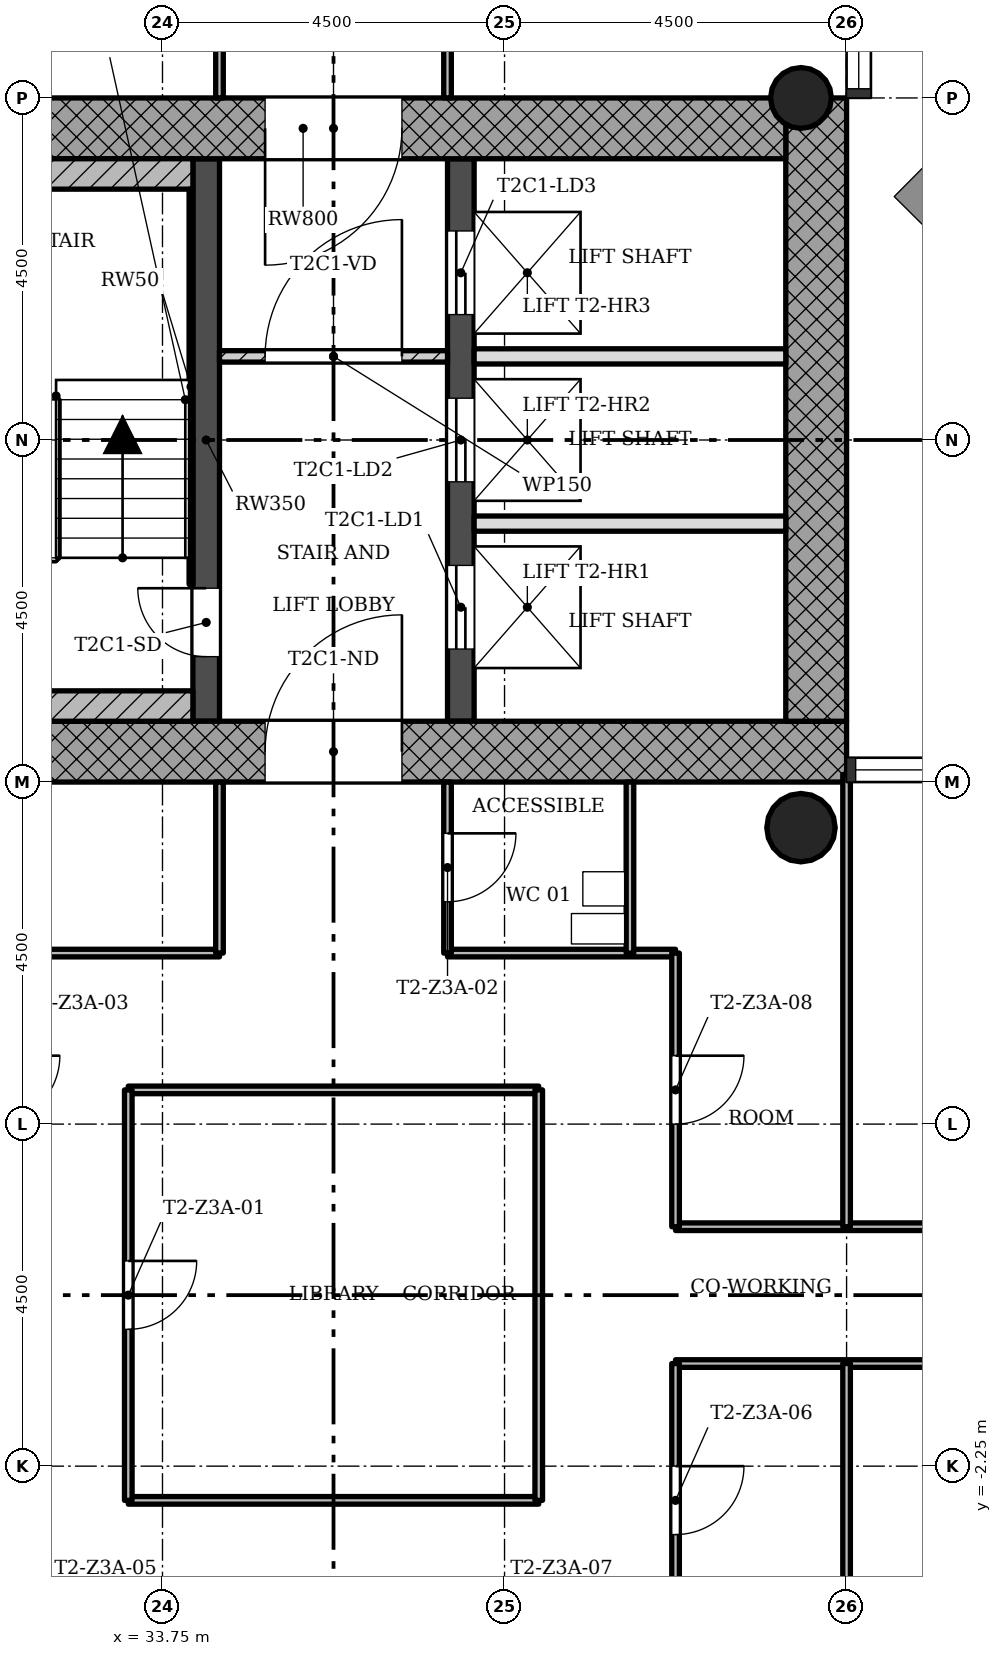
"""IFC4 building model, lengths in metres.
Left out: names, types, materials, properties, quantities, classifications, styles, units other than length and angle.
Written with IfcOpenShell. Run it as: python <this file> out.ifc"""

import sys

from ifc_helpers import new_model, si_unit, direction, frame, frame_2d, origin, origin_2d, place, context, subcontext, project, spatial, rectangle, hollow_circle, extrude, element, fill, save


model = new_model("IFC4")
c1 = context("Model", 3, precision=1e-05, world=origin(), true_north=direction((0.0, 1.0)))
c2 = subcontext(c1, "Body", "Model", "MODEL_VIEW")
j1 = project(units=[si_unit("LENGTHUNIT", "METRE"), si_unit("PLANEANGLEUNIT", "RADIAN")], contexts=[c1])
p1 = place(None, origin())
s1 = spatial("IfcSite", under=j1, at=p1, CompositionType="ELEMENT")
p2 = place(p1, origin())
s2 = spatial("IfcBuilding", under=s1, at=p2, CompositionType="ELEMENT")
p3 = place(p2, frame((0.0, 0.0, 137.1)))
s3 = spatial("IfcBuildingStorey", under=s2, at=p3, CompositionType="ELEMENT", Elevation=137.1)
p4 = place(p3, frame((30.05, 7.15, 0.0), z_axis=(0.0, 0.0, 1.0), x_axis=(1.0, 0.0, 0.0)))
e1 = element("IfcWall", 1, at=p4, inside=s3, PredefinedType="SHEAR", context=c2, shape_type="SweptSolid", body=[
    extrude(rectangle(XDim=12.7, YDim=0.8, at=frame_2d((6.35, 0.0))), origin(), (0.0, 0.0, 1.0), 3.4),
])
p5 = place(p4, frame((5.05, 0.0, 0.0)))
e2 = element("IfcOpeningElement", 2, at=p5, cuts=e1, PredefinedType="OPENING", context=c2, shape_type="SweptSolid", body=[
    extrude(rectangle(XDim=1.8, YDim=2.1, at=frame_2d((0.9, 1.05))), frame((0.0, 0.41, 0.0), z_axis=(0.0, -1.0, 0.0), x_axis=(1.0, 0.0, 0.0)), (0.0, 0.0, 1.0), 0.82),
])
p6 = place(p3, frame((42.35, 7.55, 0.0), z_axis=(0.0, 0.0, 1.0), x_axis=(0.0, 1.0, 0.0)))
e3 = element("IfcWall", 3, at=p6, inside=s3, PredefinedType="SHEAR", context=c2, shape_type="SweptSolid", body=[
    extrude(rectangle(XDim=8.2, YDim=0.8, at=frame_2d((4.1, 0.0))), origin(), (0.0, 0.0, 1.0), 3.4),
])
p7 = place(p3, frame((41.95, 15.35, 0.0), z_axis=(0.0, 0.0, 1.0), x_axis=(-1.0, 0.0, 0.0)))
e4 = element("IfcWall", 4, at=p7, inside=s3, PredefinedType="SHEAR", context=c2, shape_type="SweptSolid", body=[
    extrude(rectangle(XDim=12.7, YDim=0.8, at=frame_2d((6.35, 0.0))), origin(), (0.0, 0.0, 1.0), 3.4),
])
p8 = place(p7, frame((5.05, 0.0, 0.0)))
e5 = element("IfcOpeningElement", 5, at=p8, cuts=e4, PredefinedType="OPENING", context=c2, shape_type="SweptSolid", body=[
    extrude(rectangle(XDim=1.8, YDim=2.1, at=frame_2d((0.9, 1.05))), frame((0.0, 0.41, 0.0), z_axis=(0.0, -1.0, 0.0), x_axis=(1.0, 0.0, 0.0)), (0.0, 0.0, 1.0), 0.82),
])
p9 = place(p3, frame((34.325, 7.55, 0.0), z_axis=(0.0, 0.0, 1.0), x_axis=(0.0, 1.0, 0.0)))
e6 = element("IfcWall", 6, at=p9, inside=s3, PredefinedType="SHEAR", context=c2, shape_type="SweptSolid", body=[
    extrude(rectangle(XDim=7.4, YDim=0.35, at=frame_2d((3.7, 0.0))), origin(), (0.0, 0.0, 1.0), 3.4),
])
p10 = place(p9, frame((0.85, 0.0, 0.0)))
e7 = element("IfcOpeningElement", 7, at=p10, cuts=e6, PredefinedType="OPENING", context=c2, shape_type="SweptSolid", body=[
    extrude(rectangle(XDim=0.9, YDim=2.1, at=frame_2d((0.45, 1.05))), frame((0.0, 0.185, 0.0), z_axis=(0.0, -1.0, 0.0), x_axis=(1.0, 0.0, 0.0)), (0.0, 0.0, 1.0), 0.37),
])
p11 = place(p3, frame((37.675, 7.55, 0.0), z_axis=(0.0, 0.0, 1.0), x_axis=(0.0, 1.0, 0.0)))
e8 = element("IfcWall", 8, at=p11, inside=s3, PredefinedType="SHEAR", context=c2, shape_type="SweptSolid", body=[
    extrude(rectangle(XDim=7.4, YDim=0.35, at=frame_2d((3.7, 0.0))), origin(), (0.0, 0.0, 1.0), 3.4),
])
p12 = place(p11, frame((0.95, 0.0, 0.0)))
e9 = element("IfcOpeningElement", 9, at=p12, cuts=e8, PredefinedType="OPENING", context=c2, shape_type="SweptSolid", body=[
    extrude(rectangle(XDim=1.1, YDim=2.1, at=frame_2d((0.55, 1.05))), frame((0.0, 0.185, 0.0), z_axis=(0.0, -1.0, 0.0), x_axis=(1.0, 0.0, 0.0)), (0.0, 0.0, 1.0), 0.37),
])
p13 = place(p11, frame((3.15, 0.0, 0.0)))
e10 = element("IfcOpeningElement", 10, at=p13, cuts=e8, PredefinedType="OPENING", context=c2, shape_type="SweptSolid", body=[
    extrude(rectangle(XDim=1.1, YDim=2.1, at=frame_2d((0.55, 1.05))), frame((0.0, 0.185, 0.0), z_axis=(0.0, -1.0, 0.0), x_axis=(1.0, 0.0, 0.0)), (0.0, 0.0, 1.0), 0.37),
])
p14 = place(p11, frame((5.35, 0.0, 0.0)))
e11 = element("IfcOpeningElement", 11, at=p14, cuts=e8, PredefinedType="OPENING", context=c2, shape_type="SweptSolid", body=[
    extrude(rectangle(XDim=1.1, YDim=2.1, at=frame_2d((0.55, 1.05))), frame((0.0, 0.185, 0.0), z_axis=(0.0, -1.0, 0.0), x_axis=(1.0, 0.0, 0.0)), (0.0, 0.0, 1.0), 0.37),
])
p15 = place(p3, frame((42.15, 15.75, 0.0), z_axis=(0.0, 0.0, 1.0), x_axis=(1.0, 0.0, 0.0)))
e12 = element("IfcColumn", 12, at=p15, inside=s3, PredefinedType="COLUMN", context=c2, shape_type="SweptSolid", body=[
    extrude(hollow_circle(Radius=0.4, WallThickness=0.028, at=origin_2d()), origin(), (0.0, 0.0, 1.0), 3.4),
])
p16 = place(p3, frame((42.15, 6.15, 0.0), z_axis=(0.0, 0.0, 1.0), x_axis=(1.0, 0.0, 0.0)))
e13 = element("IfcColumn", 13, at=p16, inside=s3, PredefinedType="COLUMN", context=c2, shape_type="SweptSolid", body=[
    extrude(hollow_circle(Radius=0.45, WallThickness=0.032, at=origin_2d()), origin(), (0.0, 0.0, 1.0), 3.4),
])
p17 = place(p3, frame((37.5, 12.35, 0.0), z_axis=(0.0, 0.0, 1.0), x_axis=(-1.0, 0.0, 0.0)))
e14 = element("IfcWall", 14, at=p17, inside=s3, PredefinedType="PARTITIONING", context=c2, shape_type="SweptSolid", body=[
    extrude(rectangle(XDim=3.0, YDim=0.15, at=frame_2d((1.5, 0.0))), origin(), (0.0, 0.0, 1.0), 3.0),
])
p18 = place(p17, frame((0.6, 0.0, 0.0)))
e15 = element("IfcOpeningElement", 15, at=p18, cuts=e14, PredefinedType="OPENING", context=c2, shape_type="SweptSolid", body=[
    extrude(rectangle(XDim=1.8, YDim=2.1, at=frame_2d((0.9, 1.05))), frame((0.0, 0.085, 0.0), z_axis=(0.0, -1.0, 0.0), x_axis=(1.0, 0.0, 0.0)), (0.0, 0.0, 1.0), 0.17),
])
for number, where, z_axis, x_axis in (
    (16, (41.95, 10.15, 0.0), (0.0, 0.0, 1.0), (-1.0, 0.0, 0.0)),
    (17, (41.95, 12.35, 0.0), (0.0, 0.0, 1.0), (-1.0, 0.0, 0.0)),
):
    element("IfcWall", number, at=place(p3, frame(where, z_axis=z_axis, x_axis=x_axis)), inside=s3, PredefinedType="SOLIDWALL", context=c2, shape_type="SweptSolid", body=[
        extrude(rectangle(XDim=4.1, YDim=0.2, at=frame_2d((2.05, 0.0))), origin(), (0.0, 0.0, 1.0), 3.0),
    ])
p19 = place(p3, frame((38.7, -2.7, 0.0), z_axis=(0.0, 0.0, 1.0), x_axis=(-1.0, 0.0, 0.0)))
e18 = element("IfcWall", 18, at=p19, inside=s3, PredefinedType="PARTITIONING", context=c2, shape_type="SweptSolid", body=[
    extrude(rectangle(XDim=5.4, YDim=0.1, at=frame_2d((2.7, 0.0))), origin(), (0.0, 0.0, 1.0), 3.0),
])
p20 = place(p3, frame((47.25, -0.9, 0.0), z_axis=(0.0, 0.0, 1.0), x_axis=(-1.0, 0.0, 0.0)))
e19 = element("IfcWall", 19, at=p20, inside=s3, PredefinedType="PARTITIONING", context=c2, shape_type="SweptSolid", body=[
    extrude(rectangle(XDim=6.75, YDim=0.1, at=frame_2d((3.375, 0.0))), origin(), (0.0, 0.0, 1.0), 3.0),
])
p21 = place(p20, frame((1.8, 0.0, 0.0)))
e20 = element("IfcOpeningElement", 20, at=p21, cuts=e19, PredefinedType="OPENING", context=c2, shape_type="SweptSolid", body=[
    extrude(rectangle(XDim=0.9, YDim=2.1, at=frame_2d((0.45, 1.05))), frame((0.0, 0.06, 0.0), z_axis=(0.0, -1.0, 0.0), x_axis=(1.0, 0.0, 0.0)), (0.0, 0.0, 1.0), 0.12),
])
p22 = place(p3, frame((47.25, 0.9, 0.0), z_axis=(0.0, 0.0, 1.0), x_axis=(-1.0, 0.0, 0.0)))
e21 = element("IfcWall", 21, at=p22, inside=s3, PredefinedType="PARTITIONING", context=c2, shape_type="SweptSolid", body=[
    extrude(rectangle(XDim=6.75, YDim=0.1, at=frame_2d((3.375, 0.0))), origin(), (0.0, 0.0, 1.0), 3.0),
])
p23 = place(p22, frame((1.8, 0.0, 0.0)))
e22 = element("IfcOpeningElement", 22, at=p23, cuts=e21, PredefinedType="OPENING", context=c2, shape_type="SweptSolid", body=[
    extrude(rectangle(XDim=0.9, YDim=2.1, at=frame_2d((0.45, 1.05))), frame((0.0, 0.06, 0.0), z_axis=(0.0, -1.0, 0.0), x_axis=(1.0, 0.0, 0.0)), (0.0, 0.0, 1.0), 0.12),
])
p24 = place(p3, frame((38.7, 2.7, 0.0), z_axis=(0.0, 0.0, 1.0), x_axis=(-1.0, 0.0, 0.0)))
e23 = element("IfcWall", 23, at=p24, inside=s3, PredefinedType="PARTITIONING", context=c2, shape_type="SweptSolid", body=[
    extrude(rectangle(XDim=5.4, YDim=0.1, at=frame_2d((2.7, 0.0))), origin(), (0.0, 0.0, 1.0), 3.0),
])
for number, where, z_axis, x_axis in (
    (24, (40.5, 4.5, 0.0), (0.0, 0.0, 1.0), (-1.0, 0.0, 0.0)),
    (25, (34.5, 4.5, 0.0), (0.0, 0.0, 1.0), (-1.0, 0.0, 0.0)),
):
    element("IfcWall", number, at=place(p3, frame(where, z_axis=z_axis, x_axis=x_axis)), inside=s3, PredefinedType="PARTITIONING", context=c2, shape_type="SweptSolid", body=[
        extrude(rectangle(XDim=3.0, YDim=0.1, at=frame_2d((1.5, 0.0))), origin(), (0.0, 0.0, 1.0), 3.0),
    ])
for number, where, z_axis, x_axis in (
    (26, (42.75, -6.85, 0.0), (0.0, 0.0, 1.0), (0.0, 1.0, 0.0)),
    (27, (42.75, 0.9, 0.0), (0.0, 0.0, 1.0), (0.0, 1.0, 0.0)),
):
    element("IfcWall", number, at=place(p3, frame(where, z_axis=z_axis, x_axis=x_axis)), inside=s3, PredefinedType="PARTITIONING", context=c2, shape_type="SweptSolid", body=[
        extrude(rectangle(XDim=5.95, YDim=0.1, at=frame_2d((2.975, 0.0))), origin(), (0.0, 0.0, 1.0), 3.0),
    ])
p25 = place(p3, frame((40.5, -6.75, 0.0), z_axis=(0.0, 0.0, 1.0), x_axis=(0.0, 1.0, 0.0)))
e28 = element("IfcWall", 28, at=p25, inside=s3, PredefinedType="PARTITIONING", context=c2, shape_type="SweptSolid", body=[
    extrude(rectangle(XDim=5.85, YDim=0.1, at=frame_2d((2.925, 0.0))), origin(), (0.0, 0.0, 1.0), 3.0),
])
p26 = place(p25, frame((3.6, 0.0, 0.0)))
e29 = element("IfcOpeningElement", 29, at=p26, cuts=e28, PredefinedType="OPENING", context=c2, shape_type="SweptSolid", body=[
    extrude(rectangle(XDim=0.9, YDim=2.1, at=frame_2d((0.45, 1.05))), frame((0.0, 0.06, 0.0), z_axis=(0.0, -1.0, 0.0), x_axis=(1.0, 0.0, 0.0)), (0.0, 0.0, 1.0), 0.12),
])
p27 = place(p3, frame((40.5, 0.9, 0.0), z_axis=(0.0, 0.0, 1.0), x_axis=(0.0, 1.0, 0.0)))
e30 = element("IfcWall", 30, at=p27, inside=s3, PredefinedType="PARTITIONING", context=c2, shape_type="SweptSolid", body=[
    extrude(rectangle(XDim=3.6, YDim=0.1, at=frame_2d((1.8, 0.0))), origin(), (0.0, 0.0, 1.0), 3.0),
])
p28 = place(p27, frame((1.35, 0.0, 0.0)))
e31 = element("IfcOpeningElement", 31, at=p28, cuts=e30, PredefinedType="OPENING", context=c2, shape_type="SweptSolid", body=[
    extrude(rectangle(XDim=0.9, YDim=2.1, at=frame_2d((0.45, 1.05))), frame((0.0, 0.06, 0.0), z_axis=(0.0, -1.0, 0.0), x_axis=(1.0, 0.0, 0.0)), (0.0, 0.0, 1.0), 0.12),
])
p29 = place(p3, frame((39.9, 4.5, 0.0), z_axis=(0.0, 0.0, 1.0), x_axis=(0.0, 1.0, 0.0)))
e32 = element("IfcWall", 32, at=p29, inside=s3, PredefinedType="PARTITIONING", context=c2, shape_type="SweptSolid", body=[
    extrude(rectangle(XDim=2.25, YDim=0.1, at=frame_2d((1.125, 0.0))), origin(), (0.0, 0.0, 1.0), 3.0),
])
p30 = place(p3, frame((38.7, -2.7, 0.0), z_axis=(0.0, 0.0, 1.0), x_axis=(0.0, 1.0, 0.0)))
e33 = element("IfcWall", 33, at=p30, inside=s3, PredefinedType="PARTITIONING", context=c2, shape_type="SweptSolid", body=[
    extrude(rectangle(XDim=5.4, YDim=0.1, at=frame_2d((2.7, 0.0))), origin(), (0.0, 0.0, 1.0), 3.0),
])
p31 = place(p3, frame((37.5, 4.5, 0.0), z_axis=(0.0, 0.0, 1.0), x_axis=(0.0, 1.0, 0.0)))
e34 = element("IfcWall", 34, at=p31, inside=s3, PredefinedType="PARTITIONING", context=c2, shape_type="SweptSolid", body=[
    extrude(rectangle(XDim=2.25, YDim=0.1, at=frame_2d((1.125, 0.0))), origin(), (0.0, 0.0, 1.0), 3.0),
])
p32 = place(p31, frame((0.675, 0.0, 0.0)))
e35 = element("IfcOpeningElement", 35, at=p32, cuts=e34, PredefinedType="OPENING", context=c2, shape_type="SweptSolid", body=[
    extrude(rectangle(XDim=0.9, YDim=2.1, at=frame_2d((0.45, 1.05))), frame((0.0, 0.06, 0.0), z_axis=(0.0, -1.0, 0.0), x_axis=(1.0, 0.0, 0.0)), (0.0, 0.0, 1.0), 0.12),
])
p33 = place(p3, frame((37.5, 15.75, 0.0), z_axis=(0.0, 0.0, 1.0), x_axis=(0.0, 1.0, 0.0)))
e36 = element("IfcWall", 36, at=p33, inside=s3, PredefinedType="PARTITIONING", context=c2, shape_type="SweptSolid", body=[
    extrude(rectangle(XDim=4.5, YDim=0.1, at=frame_2d((2.25, 0.0))), origin(), (0.0, 0.0, 1.0), 3.0),
])
p34 = place(p33, frame((1.8, 0.0, 0.0)))
e37 = element("IfcOpeningElement", 37, at=p34, cuts=e36, PredefinedType="OPENING", context=c2, shape_type="SweptSolid", body=[
    extrude(rectangle(XDim=0.9, YDim=2.1, at=frame_2d((0.45, 1.05))), frame((0.0, 0.06, 0.0), z_axis=(0.0, -1.0, 0.0), x_axis=(1.0, 0.0, 0.0)), (0.0, 0.0, 1.0), 0.12),
])
p35 = place(p3, frame((34.5, 4.5, 0.0), z_axis=(0.0, 0.0, 1.0), x_axis=(0.0, 1.0, 0.0)))
e38 = element("IfcWall", 38, at=p35, inside=s3, PredefinedType="PARTITIONING", context=c2, shape_type="SweptSolid", body=[
    extrude(rectangle(XDim=2.25, YDim=0.1, at=frame_2d((1.125, 0.0))), origin(), (0.0, 0.0, 1.0), 3.0),
])
p36 = place(p3, frame((34.5, 15.75, 0.0), z_axis=(0.0, 0.0, 1.0), x_axis=(0.0, 1.0, 0.0)))
e39 = element("IfcWall", 39, at=p36, inside=s3, PredefinedType="PARTITIONING", context=c2, shape_type="SweptSolid", body=[
    extrude(rectangle(XDim=4.5, YDim=0.1, at=frame_2d((2.25, 0.0))), origin(), (0.0, 0.0, 1.0), 3.0),
])
p37 = place(p36, frame((1.8, 0.0, 0.0)))
e40 = element("IfcOpeningElement", 40, at=p37, cuts=e39, PredefinedType="OPENING", context=c2, shape_type="SweptSolid", body=[
    extrude(rectangle(XDim=0.9, YDim=2.1, at=frame_2d((0.45, 1.05))), frame((0.0, 0.06, 0.0), z_axis=(0.0, -1.0, 0.0), x_axis=(1.0, 0.0, 0.0)), (0.0, 0.0, 1.0), 0.12),
])
p38 = place(p3, frame((33.3, -2.7, 0.0), z_axis=(0.0, 0.0, 1.0), x_axis=(0.0, 1.0, 0.0)))
e41 = element("IfcWall", 41, at=p38, inside=s3, PredefinedType="PARTITIONING", context=c2, shape_type="SweptSolid", body=[
    extrude(rectangle(XDim=5.4, YDim=0.1, at=frame_2d((2.7, 0.0))), origin(), (0.0, 0.0, 1.0), 3.0),
])
p39 = place(p38, frame((2.25, 0.0, 0.0)))
e42 = element("IfcOpeningElement", 42, at=p39, cuts=e41, PredefinedType="OPENING", context=c2, shape_type="SweptSolid", body=[
    extrude(rectangle(XDim=0.9, YDim=2.1, at=frame_2d((0.45, 1.05))), frame((0.0, 0.06, 0.0), z_axis=(0.0, -1.0, 0.0), x_axis=(1.0, 0.0, 0.0)), (0.0, 0.0, 1.0), 0.12),
])
for number, where, z_axis, x_axis in (
    (43, (34.15, 14.75, 0.0), (0.0, 0.0, 1.0), (-1.0, 0.0, 0.0)),
    (44, (34.15, 7.75, 0.0), (0.0, 0.0, 1.0), (-1.0, 0.0, 0.0)),
):
    element("IfcWall", number, at=place(p3, frame(where, z_axis=z_axis, x_axis=x_axis)), inside=s3, PredefinedType="SHEAR", context=c2, shape_type="SweptSolid", body=[
        extrude(rectangle(XDim=4.1, YDim=0.4, at=frame_2d((2.05, 0.0))), origin(), (0.0, 0.0, 1.0), 3.4),
    ])
p40 = place(p3, frame((34.125, 9.35, 0.0), z_axis=(0.0, 0.0, 1.0), x_axis=(0.0, 1.0, 0.0)))
e45 = element("IfcWall", 45, at=p40, inside=s3, PredefinedType="SHEAR", context=c2, shape_type="SweptSolid", body=[
    extrude(rectangle(XDim=5.2, YDim=0.05, at=frame_2d((2.6, 0.0))), origin(), (0.0, 0.0, 1.0), 3.4),
])
p41 = place(p18, origin())
e46 = element("IfcDoor", 46, at=p41, inside=s3, OperationType="SINGLE_SWING_LEFT", PredefinedType="DOOR", context=c2, shape_type="SweptSolid", body=[
    extrude(rectangle(XDim=1.8, YDim=2.1, at=frame_2d((0.9, 1.05))), frame((0.0, 0.025, 0.0), z_axis=(0.0, -1.0, 0.0), x_axis=(1.0, 0.0, 0.0)), (0.0, 0.0, 1.0), 0.05),
])
fill(e15, e46)
p42 = place(p39, origin())
e47 = element("IfcDoor", 47, at=p42, inside=s3, OperationType="SINGLE_SWING_RIGHT", PredefinedType="DOOR", context=c2, shape_type="SweptSolid", body=[
    extrude(rectangle(XDim=0.9, YDim=2.1, at=frame_2d((0.45, 1.05))), frame((0.0, 0.025, 0.0), z_axis=(0.0, -1.0, 0.0), x_axis=(1.0, 0.0, 0.0)), (0.0, 0.0, 1.0), 0.05),
])
fill(e42, e47)
p43 = place(p32, origin())
e48 = element("IfcDoor", 48, at=p43, inside=s3, OperationType="SINGLE_SWING_RIGHT", PredefinedType="DOOR", context=c2, shape_type="SweptSolid", body=[
    extrude(rectangle(XDim=0.9, YDim=2.1, at=frame_2d((0.45, 1.05))), frame((0.0, 0.025, 0.0), z_axis=(0.0, -1.0, 0.0), x_axis=(1.0, 0.0, 0.0)), (0.0, 0.0, 1.0), 0.05),
])
fill(e35, e48)
p44 = place(p26, origin())
e49 = element("IfcDoor", 49, at=p44, inside=s3, OperationType="SINGLE_SWING_RIGHT", PredefinedType="DOOR", context=c2, shape_type="SweptSolid", body=[
    extrude(rectangle(XDim=0.9, YDim=2.1, at=frame_2d((0.45, 1.05))), frame((0.0, 0.025, 0.0), z_axis=(0.0, -1.0, 0.0), x_axis=(1.0, 0.0, 0.0)), (0.0, 0.0, 1.0), 0.05),
])
fill(e29, e49)
p45 = place(p28, origin())
e50 = element("IfcDoor", 50, at=p45, inside=s3, OperationType="SINGLE_SWING_RIGHT", PredefinedType="DOOR", context=c2, shape_type="SweptSolid", body=[
    extrude(rectangle(XDim=0.9, YDim=2.1, at=frame_2d((0.45, 1.05))), frame((0.0, 0.025, 0.0), z_axis=(0.0, -1.0, 0.0), x_axis=(1.0, 0.0, 0.0)), (0.0, 0.0, 1.0), 0.05),
])
fill(e31, e50)
p46 = place(p10, origin())
e51 = element("IfcDoor", 51, at=p46, inside=s3, OperationType="SINGLE_SWING_LEFT", PredefinedType="DOOR", context=c2, shape_type="SweptSolid", body=[
    extrude(rectangle(XDim=0.9, YDim=2.1, at=frame_2d((0.45, 1.05))), frame((0.0, 0.025, 0.0), z_axis=(0.0, -1.0, 0.0), x_axis=(1.0, 0.0, 0.0)), (0.0, 0.0, 1.0), 0.05),
])
fill(e7, e51)
p47 = place(p12, origin())
e52 = element("IfcDoor", 52, at=p47, inside=s3, OperationType="SLIDING_TO_LEFT", PredefinedType="DOOR", context=c2, shape_type="SweptSolid", body=[
    extrude(rectangle(XDim=1.1, YDim=2.1, at=frame_2d((0.55, 1.05))), frame((0.0, 0.025, 0.0), z_axis=(0.0, -1.0, 0.0), x_axis=(1.0, 0.0, 0.0)), (0.0, 0.0, 1.0), 0.05),
])
fill(e9, e52)
p48 = place(p13, origin())
e53 = element("IfcDoor", 53, at=p48, inside=s3, OperationType="SLIDING_TO_LEFT", PredefinedType="DOOR", context=c2, shape_type="SweptSolid", body=[
    extrude(rectangle(XDim=1.1, YDim=2.1, at=frame_2d((0.55, 1.05))), frame((0.0, 0.025, 0.0), z_axis=(0.0, -1.0, 0.0), x_axis=(1.0, 0.0, 0.0)), (0.0, 0.0, 1.0), 0.05),
])
fill(e10, e53)
p49 = place(p14, origin())
e54 = element("IfcDoor", 54, at=p49, inside=s3, OperationType="SLIDING_TO_LEFT", PredefinedType="DOOR", context=c2, shape_type="SweptSolid", body=[
    extrude(rectangle(XDim=1.1, YDim=2.1, at=frame_2d((0.55, 1.05))), frame((0.0, 0.025, 0.0), z_axis=(0.0, -1.0, 0.0), x_axis=(1.0, 0.0, 0.0)), (0.0, 0.0, 1.0), 0.05),
])
fill(e11, e54)
p50 = place(p5, origin())
e55 = element("IfcDoor", 55, at=p50, inside=s3, OperationType="SINGLE_SWING_LEFT", PredefinedType="DOOR", context=c2, shape_type="SweptSolid", body=[
    extrude(rectangle(XDim=1.8, YDim=2.1, at=frame_2d((0.9, 1.05))), frame((0.0, 0.025, 0.0), z_axis=(0.0, -1.0, 0.0), x_axis=(1.0, 0.0, 0.0)), (0.0, 0.0, 1.0), 0.05),
])
fill(e2, e55)
p51 = place(p8, origin())
e56 = element("IfcDoor", 56, at=p51, inside=s3, OperationType="SINGLE_SWING_LEFT", PredefinedType="DOOR", context=c2, shape_type="SweptSolid", body=[
    extrude(rectangle(XDim=1.8, YDim=2.1, at=frame_2d((0.9, 1.05))), frame((0.0, 0.025, 0.0), z_axis=(0.0, -1.0, 0.0), x_axis=(1.0, 0.0, 0.0)), (0.0, 0.0, 1.0), 0.05),
])
fill(e5, e56)
save(model, sys.argv[1])
